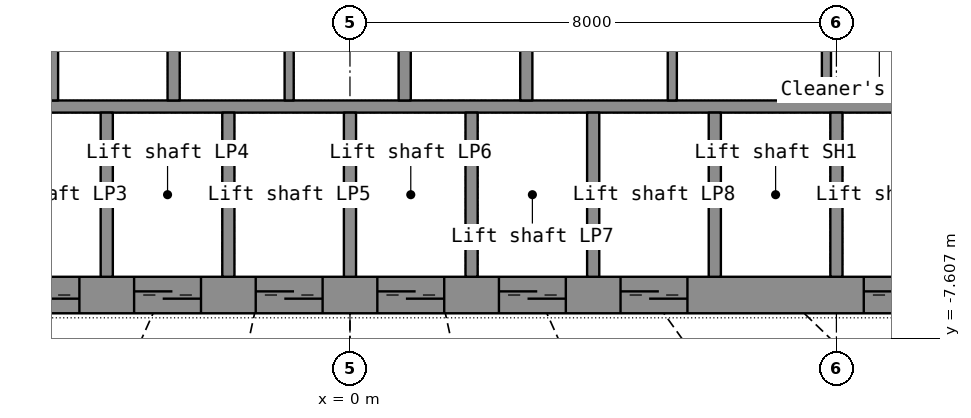
"""IFC4 building model, lengths in metres.
Left out: names, types, materials, properties, quantities, classifications, styles, units other than length and angle.
Written with IfcOpenShell. Run it as: python <this file> out.ifc"""

import sys

from ifc_helpers import new_model, si_unit, direction, frame, frame_2d, origin, place, context, subcontext, project, spatial, rectangle, extrude, element, fill, save


model = new_model("IFC4")
c1 = context("Model", 3, precision=1e-05, world=origin(), true_north=direction((0.0, 1.0)))
c2 = subcontext(c1, "Body", "Model", "MODEL_VIEW")
j1 = project(units=[si_unit("LENGTHUNIT", "METRE"), si_unit("PLANEANGLEUNIT", "RADIAN")], contexts=[c1])
p1 = place(None, origin())
s1 = spatial("IfcSite", under=j1, at=p1, CompositionType="ELEMENT")
p2 = place(p1, origin())
s2 = spatial("IfcBuilding", under=s1, at=p2, CompositionType="ELEMENT")
p3 = place(p2, frame((0.0, 0.0, 32.9)))
s3 = spatial("IfcBuildingStorey", under=s2, at=p3, CompositionType="ELEMENT", Elevation=32.9)
p4 = place(p3, frame((-11.4, -6.9, 0.0), z_axis=(0.0, 0.0, 1.0), x_axis=(1.0, 0.0, 0.0)))
e1 = element("IfcWall", 1, at=p4, inside=s3, PredefinedType="SHEAR", context=c2, shape_type="SweptSolid", body=[
    extrude(rectangle(XDim=22.8, YDim=0.6, at=frame_2d((11.4, 0.0))), origin(), (0.0, 0.0, 1.0), 3.8),
])
p5 = place(p4, frame((1.85, 0.0, 0.0)))
e2 = element("IfcOpeningElement", 2, at=p5, cuts=e1, PredefinedType="OPENING", context=c2, shape_type="SweptSolid", body=[
    extrude(rectangle(XDim=1.1, YDim=2.2, at=frame_2d((0.55, 1.1))), frame((0.0, 0.31, 0.0), z_axis=(0.0, -1.0, 0.0), x_axis=(1.0, 0.0, 0.0)), (0.0, 0.0, 1.0), 0.62),
])
p6 = place(p4, frame((3.85, 0.0, 0.0)))
e3 = element("IfcOpeningElement", 3, at=p6, cuts=e1, PredefinedType="OPENING", context=c2, shape_type="SweptSolid", body=[
    extrude(rectangle(XDim=1.1, YDim=2.2, at=frame_2d((0.55, 1.1))), frame((0.0, 0.31, 0.0), z_axis=(0.0, -1.0, 0.0), x_axis=(1.0, 0.0, 0.0)), (0.0, 0.0, 1.0), 0.62),
])
p7 = place(p4, frame((5.85, 0.0, 0.0)))
e4 = element("IfcOpeningElement", 4, at=p7, cuts=e1, PredefinedType="OPENING", context=c2, shape_type="SweptSolid", body=[
    extrude(rectangle(XDim=1.1, YDim=2.2, at=frame_2d((0.55, 1.1))), frame((0.0, 0.31, 0.0), z_axis=(0.0, -1.0, 0.0), x_axis=(1.0, 0.0, 0.0)), (0.0, 0.0, 1.0), 0.62),
])
p8 = place(p4, frame((7.85, 0.0, 0.0)))
e5 = element("IfcOpeningElement", 5, at=p8, cuts=e1, PredefinedType="OPENING", context=c2, shape_type="SweptSolid", body=[
    extrude(rectangle(XDim=1.1, YDim=2.2, at=frame_2d((0.55, 1.1))), frame((0.0, 0.31, 0.0), z_axis=(0.0, -1.0, 0.0), x_axis=(1.0, 0.0, 0.0)), (0.0, 0.0, 1.0), 0.62),
])
p9 = place(p4, frame((9.85, 0.0, 0.0)))
e6 = element("IfcOpeningElement", 6, at=p9, cuts=e1, PredefinedType="OPENING", context=c2, shape_type="SweptSolid", body=[
    extrude(rectangle(XDim=1.1, YDim=2.2, at=frame_2d((0.55, 1.1))), frame((0.0, 0.31, 0.0), z_axis=(0.0, -1.0, 0.0), x_axis=(1.0, 0.0, 0.0)), (0.0, 0.0, 1.0), 0.62),
])
p10 = place(p4, frame((11.85, 0.0, 0.0)))
e7 = element("IfcOpeningElement", 7, at=p10, cuts=e1, PredefinedType="OPENING", context=c2, shape_type="SweptSolid", body=[
    extrude(rectangle(XDim=1.1, YDim=2.2, at=frame_2d((0.55, 1.1))), frame((0.0, 0.31, 0.0), z_axis=(0.0, -1.0, 0.0), x_axis=(1.0, 0.0, 0.0)), (0.0, 0.0, 1.0), 0.62),
])
p11 = place(p4, frame((13.85, 0.0, 0.0)))
e8 = element("IfcOpeningElement", 8, at=p11, cuts=e1, PredefinedType="OPENING", context=c2, shape_type="SweptSolid", body=[
    extrude(rectangle(XDim=1.1, YDim=2.2, at=frame_2d((0.55, 1.1))), frame((0.0, 0.31, 0.0), z_axis=(0.0, -1.0, 0.0), x_axis=(1.0, 0.0, 0.0)), (0.0, 0.0, 1.0), 0.62),
])
p12 = place(p4, frame((15.85, 0.0, 0.0)))
e9 = element("IfcOpeningElement", 9, at=p12, cuts=e1, PredefinedType="OPENING", context=c2, shape_type="SweptSolid", body=[
    extrude(rectangle(XDim=1.1, YDim=2.2, at=frame_2d((0.55, 1.1))), frame((0.0, 0.31, 0.0), z_axis=(0.0, -1.0, 0.0), x_axis=(1.0, 0.0, 0.0)), (0.0, 0.0, 1.0), 0.62),
])
p13 = place(p4, frame((19.85, 0.0, 0.0)))
e10 = element("IfcOpeningElement", 10, at=p13, cuts=e1, PredefinedType="OPENING", context=c2, shape_type="SweptSolid", body=[
    extrude(rectangle(XDim=1.1, YDim=2.2, at=frame_2d((0.55, 1.1))), frame((0.0, 0.31, 0.0), z_axis=(0.0, -1.0, 0.0), x_axis=(1.0, 0.0, 0.0)), (0.0, 0.0, 1.0), 0.62),
])
p14 = place(p4, frame((0.25, 0.0, 0.0)))
e11 = element("IfcOpeningElement", 11, at=p14, cuts=e1, PredefinedType="OPENING", context=c2, shape_type="SweptSolid", body=[
    extrude(rectangle(XDim=0.8, YDim=2.05, at=frame_2d((0.4, 1.025))), frame((0.0, 0.31, 0.0), z_axis=(0.0, -1.0, 0.0), x_axis=(1.0, 0.0, 0.0)), (0.0, 0.0, 1.0), 0.62),
])
p15 = place(p4, frame((21.75, 0.0, 0.0)))
e12 = element("IfcOpeningElement", 12, at=p15, cuts=e1, PredefinedType="OPENING", context=c2, shape_type="SweptSolid", body=[
    extrude(rectangle(XDim=0.8, YDim=2.05, at=frame_2d((0.4, 1.025))), frame((0.0, 0.31, 0.0), z_axis=(0.0, -1.0, 0.0), x_axis=(1.0, 0.0, 0.0)), (0.0, 0.0, 1.0), 0.62),
])
p16 = place(p3, frame((-11.4, -3.8, 0.0), z_axis=(0.0, 0.0, 1.0), x_axis=(1.0, 0.0, 0.0)))
e13 = element("IfcWall", 13, at=p16, inside=s3, PredefinedType="SHEAR", context=c2, shape_type="SweptSolid", body=[
    extrude(rectangle(XDim=22.8, YDim=0.2, at=frame_2d((11.4, 0.0))), origin(), (0.0, 0.0, 1.0), 3.8),
])
for number, where, z_axis, x_axis in (
    (14, (-4.0, -6.6, 0.0), (0.0, 0.0, 1.0), (0.0, 1.0, 0.0)),
    (15, (-2.0, -6.6, 0.0), (0.0, 0.0, 1.0), (0.0, 1.0, 0.0)),
    (16, (0.0, -6.6, 0.0), (0.0, 0.0, 1.0), (0.0, 1.0, 0.0)),
    (17, (2.0, -6.6, 0.0), (0.0, 0.0, 1.0), (0.0, 1.0, 0.0)),
    (18, (4.0, -6.6, 0.0), (0.0, 0.0, 1.0), (0.0, 1.0, 0.0)),
    (19, (6.0, -6.6, 0.0), (0.0, 0.0, 1.0), (0.0, 1.0, 0.0)),
    (20, (8.0, -6.6, 0.0), (0.0, 0.0, 1.0), (0.0, 1.0, 0.0)),
):
    element("IfcWall", number, at=place(p3, frame(where, z_axis=z_axis, x_axis=x_axis)), inside=s3, PredefinedType="SHEAR", context=c2, shape_type="SweptSolid", body=[
        extrude(rectangle(XDim=2.7, YDim=0.2, at=frame_2d((1.35, 0.0))), origin(), (0.0, 0.0, 1.0), 3.8),
    ])
p17 = place(p3, frame((-2.9, -3.7, 0.0), z_axis=(0.0, 0.0, 1.0), x_axis=(0.0, 1.0, 0.0)))
e21 = element("IfcWall", 21, at=p17, inside=s3, PredefinedType="SHEAR", context=c2, shape_type="SweptSolid", body=[
    extrude(rectangle(XDim=7.4, YDim=0.2, at=frame_2d((3.7, 0.0))), origin(), (0.0, 0.0, 1.0), 3.8),
])
p18 = place(p17, frame((3.1, 0.0, 0.0)))
e22 = element("IfcOpeningElement", 22, at=p18, cuts=e21, PredefinedType="OPENING", context=c2, shape_type="SweptSolid", body=[
    extrude(rectangle(XDim=1.2, YDim=2.2, at=frame_2d((0.6, 1.1))), frame((0.0, 0.11, 0.0), z_axis=(0.0, -1.0, 0.0), x_axis=(1.0, 0.0, 0.0)), (0.0, 0.0, 1.0), 0.22),
])
p19 = place(p3, frame((2.9, -3.7, 0.0), z_axis=(0.0, 0.0, 1.0), x_axis=(0.0, 1.0, 0.0)))
e23 = element("IfcWall", 23, at=p19, inside=s3, PredefinedType="SHEAR", context=c2, shape_type="SweptSolid", body=[
    extrude(rectangle(XDim=7.4, YDim=0.2, at=frame_2d((3.7, 0.0))), origin(), (0.0, 0.0, 1.0), 3.8),
])
p20 = place(p19, frame((3.1, 0.0, 0.0)))
e24 = element("IfcOpeningElement", 24, at=p20, cuts=e23, PredefinedType="OPENING", context=c2, shape_type="SweptSolid", body=[
    extrude(rectangle(XDim=1.2, YDim=2.2, at=frame_2d((0.6, 1.1))), frame((0.0, 0.11, 0.0), z_axis=(0.0, -1.0, 0.0), x_axis=(1.0, 0.0, 0.0)), (0.0, 0.0, 1.0), 0.22),
])
for number, where, z_axis, x_axis in (
    (25, (0.9, -3.7, 0.0), (0.0, 0.0, 1.0), (0.0, 1.0, 0.0)),
    (26, (-4.9, -3.7, 0.0), (0.0, 0.0, 1.0), (0.0, 1.0, 0.0)),
):
    element("IfcWall", number, at=place(p3, frame(where, z_axis=z_axis, x_axis=x_axis)), inside=s3, PredefinedType="SHEAR", context=c2, shape_type="SweptSolid", body=[
        extrude(rectangle(XDim=2.35, YDim=0.2, at=frame_2d((1.175, 0.0))), origin(), (0.0, 0.0, 1.0), 3.8),
    ])
for number, where, z_axis, x_axis in (
    (27, (5.301, -3.7, 0.0), (0.0, 0.0, 1.0), (0.0, 1.0, 0.0)),
    (28, (7.836, -3.7, 0.0), (0.0, 0.0, 1.0), (0.0, 1.0, 0.0)),
    (29, (-1.0, -3.7, 0.0), (0.0, 0.0, 1.0), (0.0, 1.0, 0.0)),
):
    element("IfcWall", number, at=place(p3, frame(where, z_axis=z_axis, x_axis=x_axis)), inside=s3, PredefinedType="PARTITIONING", context=c2, shape_type="SweptSolid", body=[
        extrude(rectangle(XDim=2.35, YDim=0.15, at=frame_2d((1.175, 0.0))), origin(), (0.0, 0.0, 1.0), 3.8),
    ])
p21 = place(p7, origin())
e30 = element("IfcDoor", 30, at=p21, inside=s3, OperationType="DOUBLE_DOOR_SLIDING", PredefinedType="DOOR", context=c2, shape_type="SweptSolid", body=[
    extrude(rectangle(XDim=1.1, YDim=2.2, at=frame_2d((0.55, 1.1))), frame((0.0, 0.025, 0.0), z_axis=(0.0, -1.0, 0.0), x_axis=(1.0, 0.0, 0.0)), (0.0, 0.0, 1.0), 0.05),
])
fill(e4, e30)
p22 = place(p8, origin())
e31 = element("IfcDoor", 31, at=p22, inside=s3, OperationType="DOUBLE_DOOR_SLIDING", PredefinedType="DOOR", context=c2, shape_type="SweptSolid", body=[
    extrude(rectangle(XDim=1.1, YDim=2.2, at=frame_2d((0.55, 1.1))), frame((0.0, 0.025, 0.0), z_axis=(0.0, -1.0, 0.0), x_axis=(1.0, 0.0, 0.0)), (0.0, 0.0, 1.0), 0.05),
])
fill(e5, e31)
p23 = place(p9, origin())
e32 = element("IfcDoor", 32, at=p23, inside=s3, OperationType="DOUBLE_DOOR_SLIDING", PredefinedType="DOOR", context=c2, shape_type="SweptSolid", body=[
    extrude(rectangle(XDim=1.1, YDim=2.2, at=frame_2d((0.55, 1.1))), frame((0.0, 0.025, 0.0), z_axis=(0.0, -1.0, 0.0), x_axis=(1.0, 0.0, 0.0)), (0.0, 0.0, 1.0), 0.05),
])
fill(e6, e32)
p24 = place(p10, origin())
e33 = element("IfcDoor", 33, at=p24, inside=s3, OperationType="DOUBLE_DOOR_SLIDING", PredefinedType="DOOR", context=c2, shape_type="SweptSolid", body=[
    extrude(rectangle(XDim=1.1, YDim=2.2, at=frame_2d((0.55, 1.1))), frame((0.0, 0.025, 0.0), z_axis=(0.0, -1.0, 0.0), x_axis=(1.0, 0.0, 0.0)), (0.0, 0.0, 1.0), 0.05),
])
fill(e7, e33)
p25 = place(p11, origin())
e34 = element("IfcDoor", 34, at=p25, inside=s3, OperationType="DOUBLE_DOOR_SLIDING", PredefinedType="DOOR", context=c2, shape_type="SweptSolid", body=[
    extrude(rectangle(XDim=1.1, YDim=2.2, at=frame_2d((0.55, 1.1))), frame((0.0, 0.025, 0.0), z_axis=(0.0, -1.0, 0.0), x_axis=(1.0, 0.0, 0.0)), (0.0, 0.0, 1.0), 0.05),
])
fill(e8, e34)
p26 = place(p12, origin())
e35 = element("IfcDoor", 35, at=p26, inside=s3, OperationType="DOUBLE_DOOR_SLIDING", PredefinedType="DOOR", context=c2, shape_type="SweptSolid", body=[
    extrude(rectangle(XDim=1.1, YDim=2.2, at=frame_2d((0.55, 1.1))), frame((0.0, 0.025, 0.0), z_axis=(0.0, -1.0, 0.0), x_axis=(1.0, 0.0, 0.0)), (0.0, 0.0, 1.0), 0.05),
])
fill(e9, e35)
p27 = place(p13, origin())
e36 = element("IfcDoor", 36, at=p27, inside=s3, OperationType="DOUBLE_DOOR_SLIDING", PredefinedType="DOOR", context=c2, shape_type="SweptSolid", body=[
    extrude(rectangle(XDim=1.1, YDim=2.2, at=frame_2d((0.55, 1.1))), frame((0.0, 0.025, 0.0), z_axis=(0.0, -1.0, 0.0), x_axis=(1.0, 0.0, 0.0)), (0.0, 0.0, 1.0), 0.05),
])
fill(e10, e36)
save(model, sys.argv[1])
